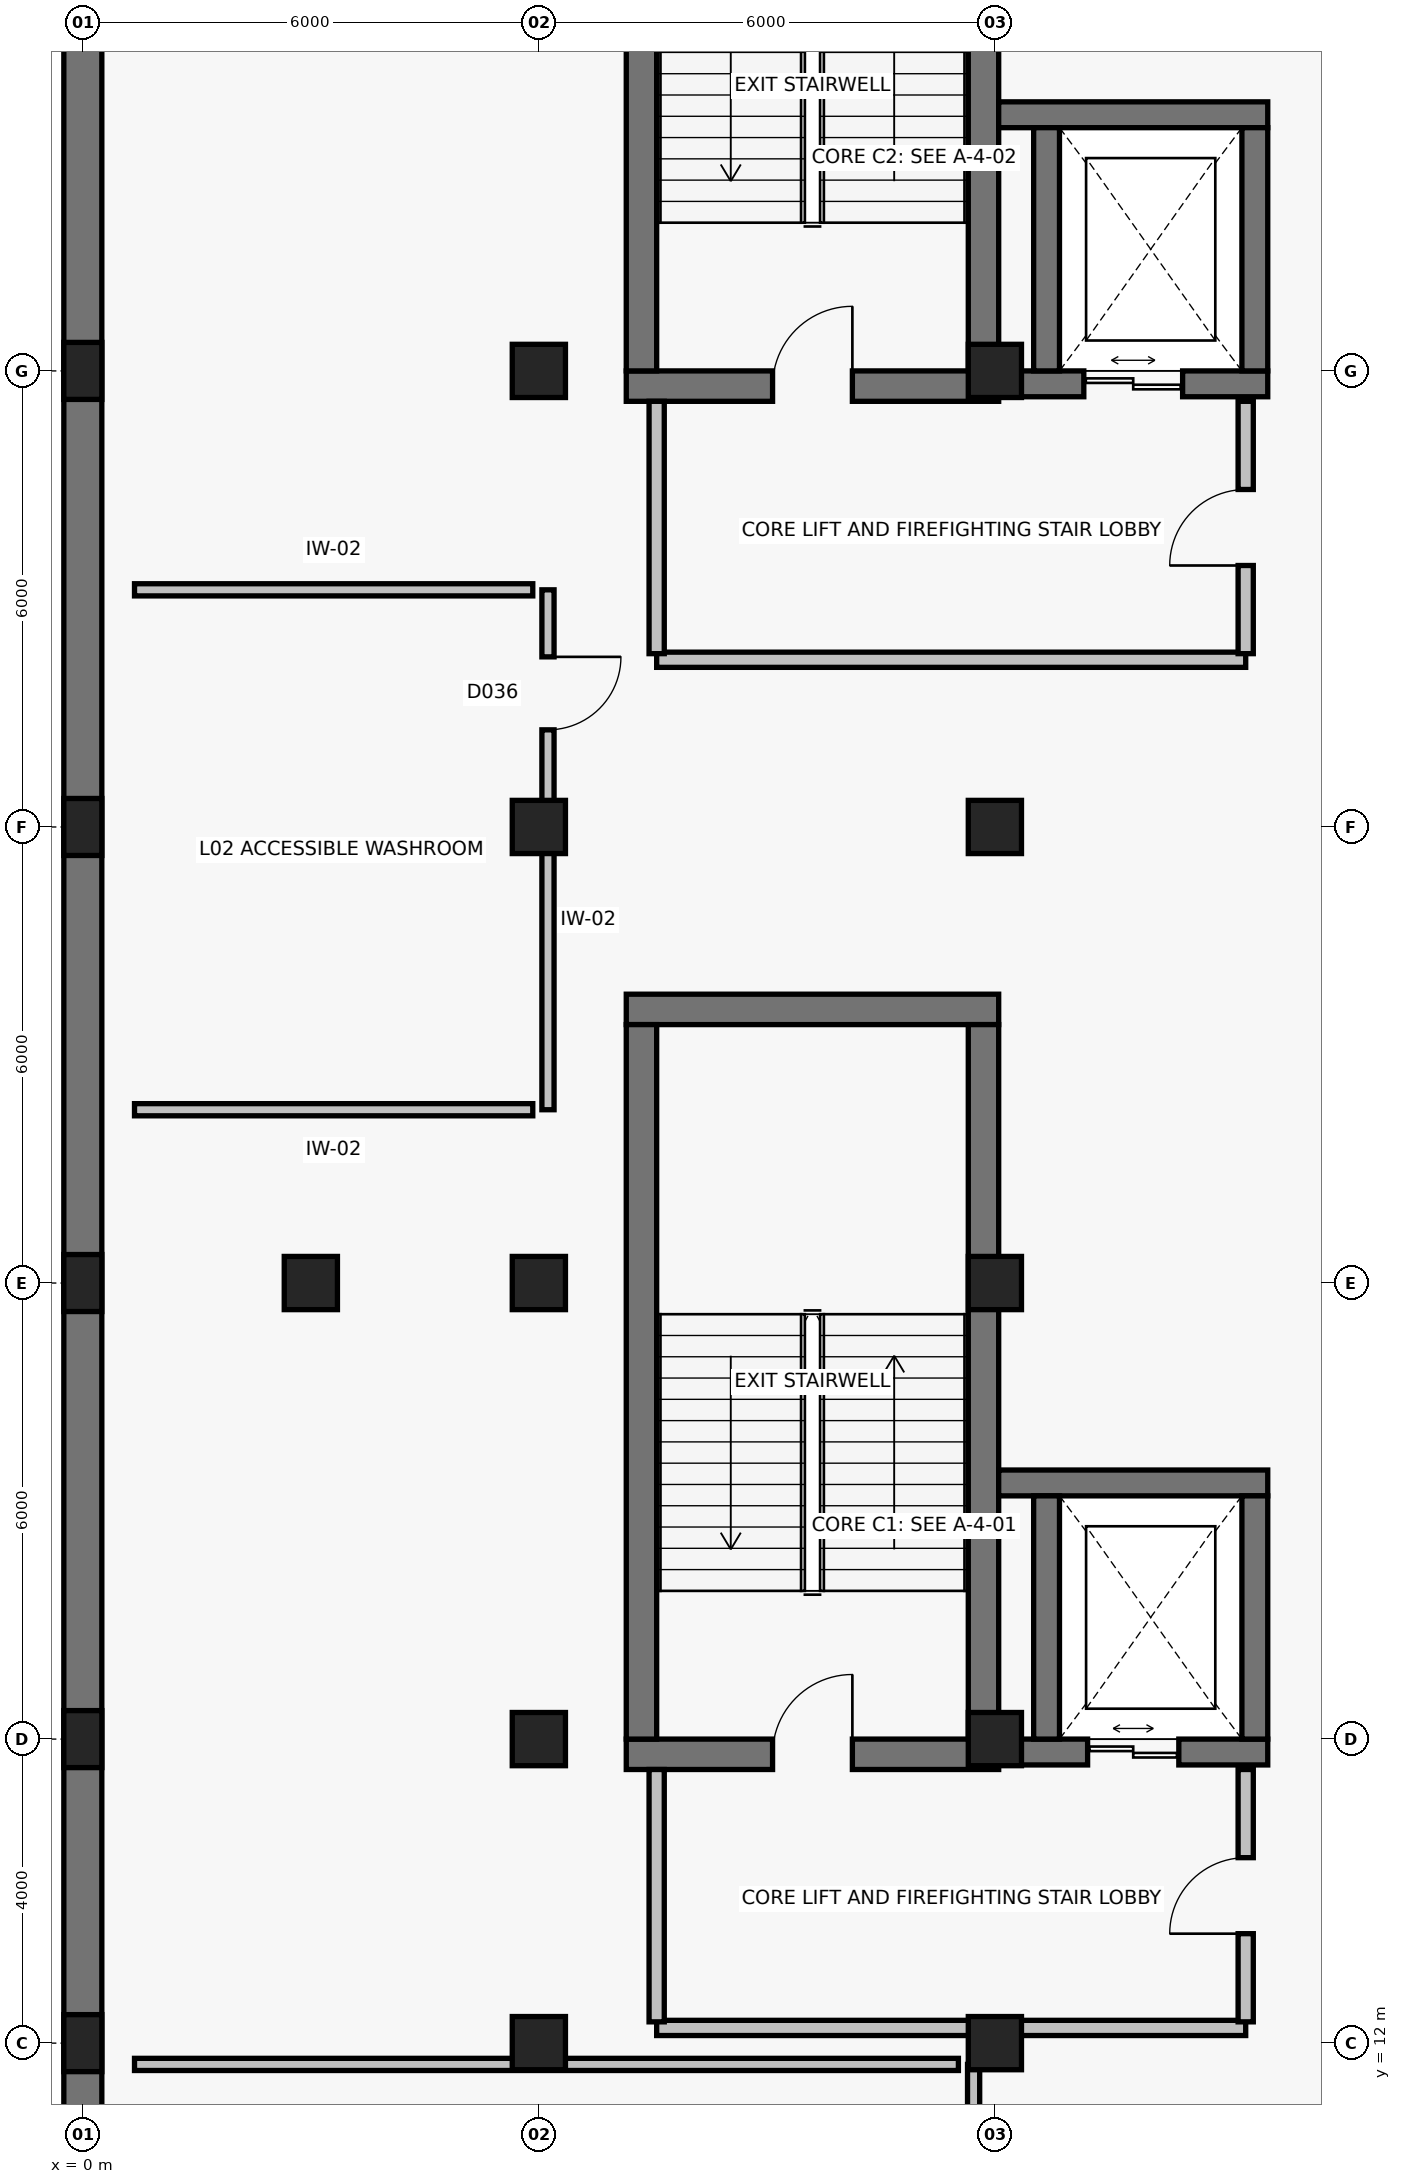
"""IFC4 building model, lengths in metres.
Left out: names, types, materials, properties, quantities, classifications, styles, units other than length and angle.
Written with IfcOpenShell. Run it as: python <this file> out.ifc"""

import sys

from ifc_helpers import new_model, si_unit, direction, frame, frame_2d, origin, origin_2d, place, context, subcontext, project, spatial, rectangle, extrude, element, fill, save


model = new_model("IFC4")
c1 = context("Model", 3, precision=1e-05, world=origin(), true_north=direction((0.0, 1.0)))
c2 = subcontext(c1, "Body", "Model", "MODEL_VIEW")
j1 = project(units=[si_unit("LENGTHUNIT", "METRE"), si_unit("PLANEANGLEUNIT", "RADIAN")], contexts=[c1])
p1 = place(None, origin())
s1 = spatial("IfcSite", under=j1, at=p1, CompositionType="ELEMENT")
p2 = place(p1, origin())
s2 = spatial("IfcBuilding", under=s1, at=p2, CompositionType="ELEMENT")
p3 = place(p2, frame((0.0, 0.0, 6.6)))
s3 = spatial("IfcBuildingStorey", under=s2, at=p3, CompositionType="ELEMENT", Elevation=6.6)
for number, where, z_axis, x_axis in (
    (1, (0.0, 12.0, 0.0), (0.0, 0.0, 1.0), (1.0, 0.0, 0.0)),
    (2, (0.0, 16.0, 0.0), (0.0, 0.0, 1.0), (1.0, 0.0, 0.0)),
    (3, (0.0, 22.0, 0.0), (0.0, 0.0, 1.0), (1.0, 0.0, 0.0)),
    (4, (0.0, 28.0, 0.0), (0.0, 0.0, 1.0), (1.0, 0.0, 0.0)),
    (5, (0.0, 34.0, 0.0), (0.0, 0.0, 1.0), (1.0, 0.0, 0.0)),
):
    element("IfcColumn", number, at=place(p3, frame(where, z_axis=z_axis, x_axis=x_axis)), inside=s3, PredefinedType="PILASTER", context=c2, shape_type="SweptSolid", body=[
        extrude(rectangle(XDim=0.5, YDim=0.75, at=origin_2d()), origin(), (0.0, 0.0, 1.0), 4.8),
    ])
for number, where, z_axis, x_axis in (
    (6, (3.0, 22.0, 0.0), (0.0, 0.0, 1.0), (1.0, 0.0, 0.0)),
    (7, (6.0, 12.0, 0.0), (0.0, 0.0, 1.0), (1.0, 0.0, 0.0)),
    (8, (6.0, 16.0, 0.0), (0.0, 0.0, 1.0), (1.0, 0.0, 0.0)),
    (9, (6.0, 22.0, 0.0), (0.0, 0.0, 1.0), (1.0, 0.0, 0.0)),
    (10, (6.0, 28.0, 0.0), (0.0, 0.0, 1.0), (1.0, 0.0, 0.0)),
    (11, (6.0, 34.0, 0.0), (0.0, 0.0, 1.0), (1.0, 0.0, 0.0)),
    (12, (12.0, 12.0, 0.0), (0.0, 0.0, 1.0), (1.0, 0.0, 0.0)),
    (13, (12.0, 16.0, 0.0), (0.0, 0.0, 1.0), (1.0, 0.0, 0.0)),
    (14, (12.0, 22.0, 0.0), (0.0, 0.0, 1.0), (1.0, 0.0, 0.0)),
    (15, (12.0, 28.0, 0.0), (0.0, 0.0, 1.0), (1.0, 0.0, 0.0)),
    (16, (12.0, 34.0, 0.0), (0.0, 0.0, 1.0), (1.0, 0.0, 0.0)),
):
    element("IfcColumn", number, at=place(p3, frame(where, z_axis=z_axis, x_axis=x_axis)), inside=s3, PredefinedType="COLUMN", context=c2, shape_type="SweptSolid", body=[
        extrude(rectangle(XDim=0.7, YDim=0.7, at=origin_2d()), origin(), (0.0, 0.0, 1.0), 4.8),
    ])
p4 = place(p3, frame((0.0, -0.008, 0.0), z_axis=(0.0, 0.0, 1.0), x_axis=(0.0, 1.0, 0.0)))
e17 = element("IfcWall", 17, at=p4, inside=s3, PredefinedType="SOLIDWALL", context=c2, shape_type="SweptSolid", body=[
    extrude(rectangle(XDim=96.016, YDim=0.5, at=frame_2d((48.008, 0.0))), origin(), (0.0, 0.0, 1.0), 4.48),
])
p5 = place(p3, frame((7.15, 15.8, 0.0), z_axis=(0.0, 0.0, 1.0), x_axis=(1.0, 0.0, 0.0)))
e18 = element("IfcWall", 18, at=p5, inside=s3, PredefinedType="SHEAR", context=c2, shape_type="SweptSolid", body=[
    extrude(rectangle(XDim=4.9, YDim=0.4, at=frame_2d((2.45, 0.0))), origin(), (0.0, 0.0, 1.0), 4.54),
])
p6 = place(p5, frame((1.925, 0.0, 0.0)))
e19 = element("IfcOpeningElement", 19, at=p6, cuts=e18, PredefinedType="OPENING", context=c2, shape_type="SweptSolid", body=[
    extrude(rectangle(XDim=1.05, YDim=2.15, at=frame_2d((0.525, 1.075))), frame((0.0, 0.215, 0.0), z_axis=(0.0, -1.0, 0.0), x_axis=(1.0, 0.0, 0.0)), (0.0, 0.0, 1.0), 0.43),
])
p7 = place(p3, frame((12.05, 25.6, 0.0), z_axis=(0.0, 0.0, 1.0), x_axis=(-1.0, 0.0, 0.0)))
e20 = element("IfcWall", 20, at=p7, inside=s3, PredefinedType="SHEAR", context=c2, shape_type="SweptSolid", body=[
    extrude(rectangle(XDim=4.9, YDim=0.4, at=frame_2d((2.45, 0.0))), origin(), (0.0, 0.0, 1.0), 4.54),
])
for number, where, z_axis, x_axis in (
    (21, (7.35, 25.4, 0.0), (0.0, 0.0, 1.0), (0.0, -1.0, 0.0)),
    (22, (11.85, 16.0, 0.0), (0.0, 0.0, 1.0), (0.0, 1.0, 0.0)),
):
    element("IfcWall", number, at=place(p3, frame(where, z_axis=z_axis, x_axis=x_axis)), inside=s3, PredefinedType="SHEAR", context=c2, shape_type="SweptSolid", body=[
        extrude(rectangle(XDim=9.4, YDim=0.4, at=frame_2d((4.7, 0.0))), origin(), (0.0, 0.0, 1.0), 4.54),
    ])
p8 = place(p3, frame((12.05, 15.83, 0.0), z_axis=(0.0, 0.0, 1.0), x_axis=(1.0, 0.0, 0.0)))
e23 = element("IfcWall", 23, at=p8, inside=s3, PredefinedType="SHEAR", context=c2, shape_type="SweptSolid", body=[
    extrude(rectangle(XDim=3.54, YDim=0.34, at=frame_2d((1.77, 0.0))), origin(), (0.0, 0.0, 1.0), 4.54),
])
p9 = place(p8, frame((1.17, 0.0, 0.0)))
e24 = element("IfcOpeningElement", 24, at=p9, cuts=e23, PredefinedType="OPENING", context=c2, shape_type="SweptSolid", body=[
    extrude(rectangle(XDim=1.2, YDim=2.2, at=frame_2d((0.6, 1.1))), frame((0.0, 0.185, 0.0), z_axis=(0.0, -1.0, 0.0), x_axis=(1.0, 0.0, 0.0)), (0.0, 0.0, 1.0), 0.37),
])
p10 = place(p3, frame((15.59, 19.37, 0.0), z_axis=(0.0, 0.0, 1.0), x_axis=(-1.0, 0.0, 0.0)))
e25 = element("IfcWall", 25, at=p10, inside=s3, PredefinedType="SHEAR", context=c2, shape_type="SweptSolid", body=[
    extrude(rectangle(XDim=3.54, YDim=0.34, at=frame_2d((1.77, 0.0))), origin(), (0.0, 0.0, 1.0), 4.54),
])
for number, where, z_axis, x_axis in (
    (26, (12.68, 19.2, 0.0), (0.0, 0.0, 1.0), (0.0, -1.0, 0.0)),
    (27, (15.42, 16.0, 0.0), (0.0, 0.0, 1.0), (0.0, 1.0, 0.0)),
):
    element("IfcWall", number, at=place(p3, frame(where, z_axis=z_axis, x_axis=x_axis)), inside=s3, PredefinedType="SHEAR", context=c2, shape_type="SweptSolid", body=[
        extrude(rectangle(XDim=3.2, YDim=0.34, at=frame_2d((1.6, 0.0))), origin(), (0.0, 0.0, 1.0), 4.54),
    ])
p11 = place(p3, frame((7.55, 12.2, 0.0), z_axis=(0.0, 0.0, 1.0), x_axis=(1.0, 0.0, 0.0)))
e28 = element("IfcWall", 28, at=p11, inside=s3, PredefinedType="PARTITIONING", context=c2, shape_type="SweptSolid", body=[
    extrude(rectangle(XDim=7.75, YDim=0.2, at=frame_2d((3.875, 0.0))), origin(), (0.0, 0.0, 1.0), 3.911),
])
p12 = place(p3, frame((7.55, 15.6, 0.0), z_axis=(0.0, 0.0, 1.0), x_axis=(0.0, -1.0, 0.0)))
e29 = element("IfcWall", 29, at=p12, inside=s3, PredefinedType="PARTITIONING", context=c2, shape_type="SweptSolid", body=[
    extrude(rectangle(XDim=3.32, YDim=0.2, at=frame_2d((1.66, 0.0))), origin(), (0.0, 0.0, 1.0), 4.04),
])
p13 = place(p3, frame((15.3, 12.28, 0.0), z_axis=(0.0, 0.0, 1.0), x_axis=(0.0, 1.0, 0.0)))
e30 = element("IfcWall", 30, at=p13, inside=s3, PredefinedType="PARTITIONING", context=c2, shape_type="SweptSolid", body=[
    extrude(rectangle(XDim=3.32, YDim=0.2, at=frame_2d((1.66, 0.0))), origin(), (0.0, 0.0, 1.0), 4.094),
])
p14 = place(p13, frame((1.16, 0.0, 0.0)))
e31 = element("IfcOpeningElement", 31, at=p14, cuts=e30, PredefinedType="OPENING", context=c2, shape_type="SweptSolid", body=[
    extrude(rectangle(XDim=1.0, YDim=2.15, at=frame_2d((0.5, 1.075))), frame((0.0, 0.115, 0.0), z_axis=(0.0, -1.0, 0.0), x_axis=(1.0, 0.0, 0.0)), (0.0, 0.0, 1.0), 0.23),
])
p15 = place(p3, frame((7.15, 33.8, 0.0), z_axis=(0.0, 0.0, 1.0), x_axis=(1.0, 0.0, 0.0)))
e32 = element("IfcWall", 32, at=p15, inside=s3, PredefinedType="SHEAR", context=c2, shape_type="SweptSolid", body=[
    extrude(rectangle(XDim=4.9, YDim=0.4, at=frame_2d((2.45, 0.0))), origin(), (0.0, 0.0, 1.0), 4.54),
])
p16 = place(p15, frame((1.925, 0.0, 0.0)))
e33 = element("IfcOpeningElement", 33, at=p16, cuts=e32, PredefinedType="OPENING", context=c2, shape_type="SweptSolid", body=[
    extrude(rectangle(XDim=1.05, YDim=2.15, at=frame_2d((0.525, 1.075))), frame((0.0, 0.215, 0.0), z_axis=(0.0, -1.0, 0.0), x_axis=(1.0, 0.0, 0.0)), (0.0, 0.0, 1.0), 0.43),
])
for number, where, z_axis, x_axis in (
    (34, (7.35, 43.4, 0.0), (0.0, 0.0, 1.0), (0.0, -1.0, 0.0)),
    (35, (11.85, 34.0, 0.0), (0.0, 0.0, 1.0), (0.0, 1.0, 0.0)),
):
    element("IfcWall", number, at=place(p3, frame(where, z_axis=z_axis, x_axis=x_axis)), inside=s3, PredefinedType="SHEAR", context=c2, shape_type="SweptSolid", body=[
        extrude(rectangle(XDim=9.4, YDim=0.4, at=frame_2d((4.7, 0.0))), origin(), (0.0, 0.0, 1.0), 4.54),
    ])
p17 = place(p3, frame((12.05, 33.83, 0.0), z_axis=(0.0, 0.0, 1.0), x_axis=(1.0, 0.0, 0.0)))
e36 = element("IfcWall", 36, at=p17, inside=s3, PredefinedType="SHEAR", context=c2, shape_type="SweptSolid", body=[
    extrude(rectangle(XDim=3.54, YDim=0.34, at=frame_2d((1.77, 0.0))), origin(), (0.0, 0.0, 1.0), 4.54),
])
p18 = place(p17, frame((1.12, 0.0, 0.0)))
e37 = element("IfcOpeningElement", 37, at=p18, cuts=e36, PredefinedType="OPENING", context=c2, shape_type="SweptSolid", body=[
    extrude(rectangle(XDim=1.3, YDim=2.25, at=frame_2d((0.65, 1.125))), frame((0.0, 0.185, 0.0), z_axis=(0.0, -1.0, 0.0), x_axis=(1.0, 0.0, 0.0)), (0.0, 0.0, 1.0), 0.37),
])
p19 = place(p3, frame((15.59, 37.37, 0.0), z_axis=(0.0, 0.0, 1.0), x_axis=(-1.0, 0.0, 0.0)))
e38 = element("IfcWall", 38, at=p19, inside=s3, PredefinedType="SHEAR", context=c2, shape_type="SweptSolid", body=[
    extrude(rectangle(XDim=3.54, YDim=0.34, at=frame_2d((1.77, 0.0))), origin(), (0.0, 0.0, 1.0), 4.54),
])
for number, where, z_axis, x_axis in (
    (39, (12.68, 37.2, 0.0), (0.0, 0.0, 1.0), (0.0, -1.0, 0.0)),
    (40, (15.42, 34.0, 0.0), (0.0, 0.0, 1.0), (0.0, 1.0, 0.0)),
):
    element("IfcWall", number, at=place(p3, frame(where, z_axis=z_axis, x_axis=x_axis)), inside=s3, PredefinedType="SHEAR", context=c2, shape_type="SweptSolid", body=[
        extrude(rectangle(XDim=3.2, YDim=0.34, at=frame_2d((1.6, 0.0))), origin(), (0.0, 0.0, 1.0), 4.54),
    ])
p20 = place(p3, frame((7.55, 30.2, 0.0), z_axis=(0.0, 0.0, 1.0), x_axis=(1.0, 0.0, 0.0)))
e41 = element("IfcWall", 41, at=p20, inside=s3, PredefinedType="PARTITIONING", context=c2, shape_type="SweptSolid", body=[
    extrude(rectangle(XDim=7.75, YDim=0.2, at=frame_2d((3.875, 0.0))), origin(), (0.0, 0.0, 1.0), 3.911),
])
p21 = place(p3, frame((7.55, 33.6, 0.0), z_axis=(0.0, 0.0, 1.0), x_axis=(0.0, -1.0, 0.0)))
e42 = element("IfcWall", 42, at=p21, inside=s3, PredefinedType="PARTITIONING", context=c2, shape_type="SweptSolid", body=[
    extrude(rectangle(XDim=3.32, YDim=0.2, at=frame_2d((1.66, 0.0))), origin(), (0.0, 0.0, 1.0), 4.48),
])
p22 = place(p3, frame((15.3, 30.28, 0.0), z_axis=(0.0, 0.0, 1.0), x_axis=(0.0, 1.0, 0.0)))
e43 = element("IfcWall", 43, at=p22, inside=s3, PredefinedType="PARTITIONING", context=c2, shape_type="SweptSolid", body=[
    extrude(rectangle(XDim=3.32, YDim=0.2, at=frame_2d((1.66, 0.0))), origin(), (0.0, 0.0, 1.0), 4.48),
])
p23 = place(p22, frame((1.16, 0.0, 0.0)))
e44 = element("IfcOpeningElement", 44, at=p23, cuts=e43, PredefinedType="OPENING", context=c2, shape_type="SweptSolid", body=[
    extrude(rectangle(XDim=1.0, YDim=2.15, at=frame_2d((0.5, 1.075))), frame((0.0, 0.115, 0.0), z_axis=(0.0, -1.0, 0.0), x_axis=(1.0, 0.0, 0.0)), (0.0, 0.0, 1.0), 0.23),
])
p24 = place(p3, frame((11.72, 11.72, 0.0), z_axis=(0.0, 0.0, 1.0), x_axis=(0.0, -1.0, 0.0)))
e45 = element("IfcWall", 45, at=p24, inside=s3, PredefinedType="PARTITIONING", context=c2, shape_type="SweptSolid", body=[
    extrude(rectangle(XDim=11.04, YDim=0.16, at=frame_2d((5.52, 0.0))), origin(), (0.0, 0.0, 1.0), 3.911),
])
p25 = place(p24, frame((5.06, 0.0, 0.0)))
e46 = element("IfcOpeningElement", 46, at=p25, cuts=e45, PredefinedType="OPENING", context=c2, shape_type="SweptSolid", body=[
    extrude(rectangle(XDim=0.92, YDim=2.1, at=frame_2d((0.46, 1.05))), frame((0.0, 0.095, 0.0), z_axis=(0.0, -1.0, 0.0), x_axis=(1.0, 0.0, 0.0)), (0.0, 0.0, 1.0), 0.19),
])
p26 = place(p3, frame((0.68, 11.72, 0.0), z_axis=(0.0, 0.0, 1.0), x_axis=(1.0, 0.0, 0.0)))
e47 = element("IfcWall", 47, at=p26, inside=s3, PredefinedType="PARTITIONING", context=c2, shape_type="SweptSolid", body=[
    extrude(rectangle(XDim=10.84, YDim=0.16, at=frame_2d((5.42, 0.0))), origin(), (0.0, 0.0, 1.0), 3.987),
])
p27 = place(p3, frame((6.12, 31.12, 0.0), z_axis=(0.0, 0.0, 1.0), x_axis=(0.0, -1.0, 0.0)))
e48 = element("IfcWall", 48, at=p27, inside=s3, PredefinedType="PARTITIONING", context=c2, shape_type="SweptSolid", body=[
    extrude(rectangle(XDim=6.84, YDim=0.16, at=frame_2d((3.42, 0.0))), origin(), (0.0, 0.0, 1.0), 3.911),
])
p28 = place(p27, frame((0.882, 0.0, 0.0)))
e49 = element("IfcOpeningElement", 49, at=p28, cuts=e48, PredefinedType="OPENING", context=c2, shape_type="SweptSolid", body=[
    extrude(rectangle(XDim=0.96, YDim=2.1, at=frame_2d((0.48, 1.05))), frame((0.0, 0.095, 0.0), z_axis=(0.0, -1.0, 0.0), x_axis=(1.0, 0.0, 0.0)), (0.0, 0.0, 1.0), 0.19),
])
p29 = place(p3, frame((0.68, 31.12, 0.0), z_axis=(0.0, 0.0, 1.0), x_axis=(1.0, 0.0, 0.0)))
e50 = element("IfcWall", 50, at=p29, inside=s3, PredefinedType="PARTITIONING", context=c2, shape_type="SweptSolid", body=[
    extrude(rectangle(XDim=5.24, YDim=0.16, at=frame_2d((2.62, 0.0))), origin(), (0.0, 0.0, 1.0), 4.04),
])
p30 = place(p3, frame((5.92, 24.28, 0.0), z_axis=(0.0, 0.0, 1.0), x_axis=(-1.0, 0.0, 0.0)))
e51 = element("IfcWall", 51, at=p30, inside=s3, PredefinedType="PARTITIONING", context=c2, shape_type="SweptSolid", body=[
    extrude(rectangle(XDim=5.24, YDim=0.16, at=frame_2d((2.62, 0.0))), origin(), (0.0, 0.0, 1.0), 3.911),
])
p31 = place(p6, origin())
e52 = element("IfcDoor", 52, at=p31, inside=s3, OperationType="SINGLE_SWING_RIGHT", PredefinedType="DOOR", context=c2, shape_type="SweptSolid", body=[
    extrude(rectangle(XDim=1.05, YDim=2.15, at=frame_2d((0.525, 1.075))), frame((0.0, 0.025, 0.0), z_axis=(0.0, -1.0, 0.0), x_axis=(1.0, 0.0, 0.0)), (0.0, 0.0, 1.0), 0.05),
])
fill(e19, e52)
p32 = place(p9, origin())
e53 = element("IfcDoor", 53, at=p32, inside=s3, OperationType="DOUBLE_DOOR_SLIDING", PredefinedType="DOOR", context=c2, shape_type="SweptSolid", body=[
    extrude(rectangle(XDim=1.2, YDim=2.2, at=frame_2d((0.6, 1.1))), frame((0.0, 0.025, 0.0), z_axis=(0.0, -1.0, 0.0), x_axis=(1.0, 0.0, 0.0)), (0.0, 0.0, 1.0), 0.05),
])
fill(e24, e53)
p33 = place(p14, origin())
e54 = element("IfcDoor", 54, at=p33, inside=s3, OperationType="SINGLE_SWING_LEFT", PredefinedType="DOOR", context=c2, shape_type="SweptSolid", body=[
    extrude(rectangle(XDim=1.0, YDim=2.15, at=frame_2d((0.5, 1.075))), frame((0.0, 0.025, 0.0), z_axis=(0.0, -1.0, 0.0), x_axis=(1.0, 0.0, 0.0)), (0.0, 0.0, 1.0), 0.05),
])
fill(e31, e54)
p34 = place(p16, origin())
e55 = element("IfcDoor", 55, at=p34, inside=s3, OperationType="SINGLE_SWING_RIGHT", PredefinedType="DOOR", context=c2, shape_type="SweptSolid", body=[
    extrude(rectangle(XDim=1.05, YDim=2.15, at=frame_2d((0.525, 1.075))), frame((0.0, 0.025, 0.0), z_axis=(0.0, -1.0, 0.0), x_axis=(1.0, 0.0, 0.0)), (0.0, 0.0, 1.0), 0.05),
])
fill(e33, e55)
p35 = place(p18, origin())
e56 = element("IfcDoor", 56, at=p35, inside=s3, OperationType="DOUBLE_DOOR_SLIDING", PredefinedType="DOOR", context=c2, shape_type="SweptSolid", body=[
    extrude(rectangle(XDim=1.3, YDim=2.25, at=frame_2d((0.65, 1.125))), frame((0.0, 0.025, 0.0), z_axis=(0.0, -1.0, 0.0), x_axis=(1.0, 0.0, 0.0)), (0.0, 0.0, 1.0), 0.05),
])
fill(e37, e56)
p36 = place(p23, origin())
e57 = element("IfcDoor", 57, at=p36, inside=s3, OperationType="SINGLE_SWING_LEFT", PredefinedType="DOOR", context=c2, shape_type="SweptSolid", body=[
    extrude(rectangle(XDim=1.0, YDim=2.15, at=frame_2d((0.5, 1.075))), frame((0.0, 0.025, 0.0), z_axis=(0.0, -1.0, 0.0), x_axis=(1.0, 0.0, 0.0)), (0.0, 0.0, 1.0), 0.05),
])
fill(e44, e57)
p37 = place(p28, origin())
e58 = element("IfcDoor", 58, at=p37, inside=s3, OperationType="SINGLE_SWING_LEFT", PredefinedType="DOOR", context=c2, shape_type="SweptSolid", body=[
    extrude(rectangle(XDim=0.96, YDim=2.1, at=frame_2d((0.48, 1.05))), frame((0.0, 0.025, 0.0), z_axis=(0.0, -1.0, 0.0), x_axis=(1.0, 0.0, 0.0)), (0.0, 0.0, 1.0), 0.05),
])
fill(e49, e58)
save(model, sys.argv[1])
